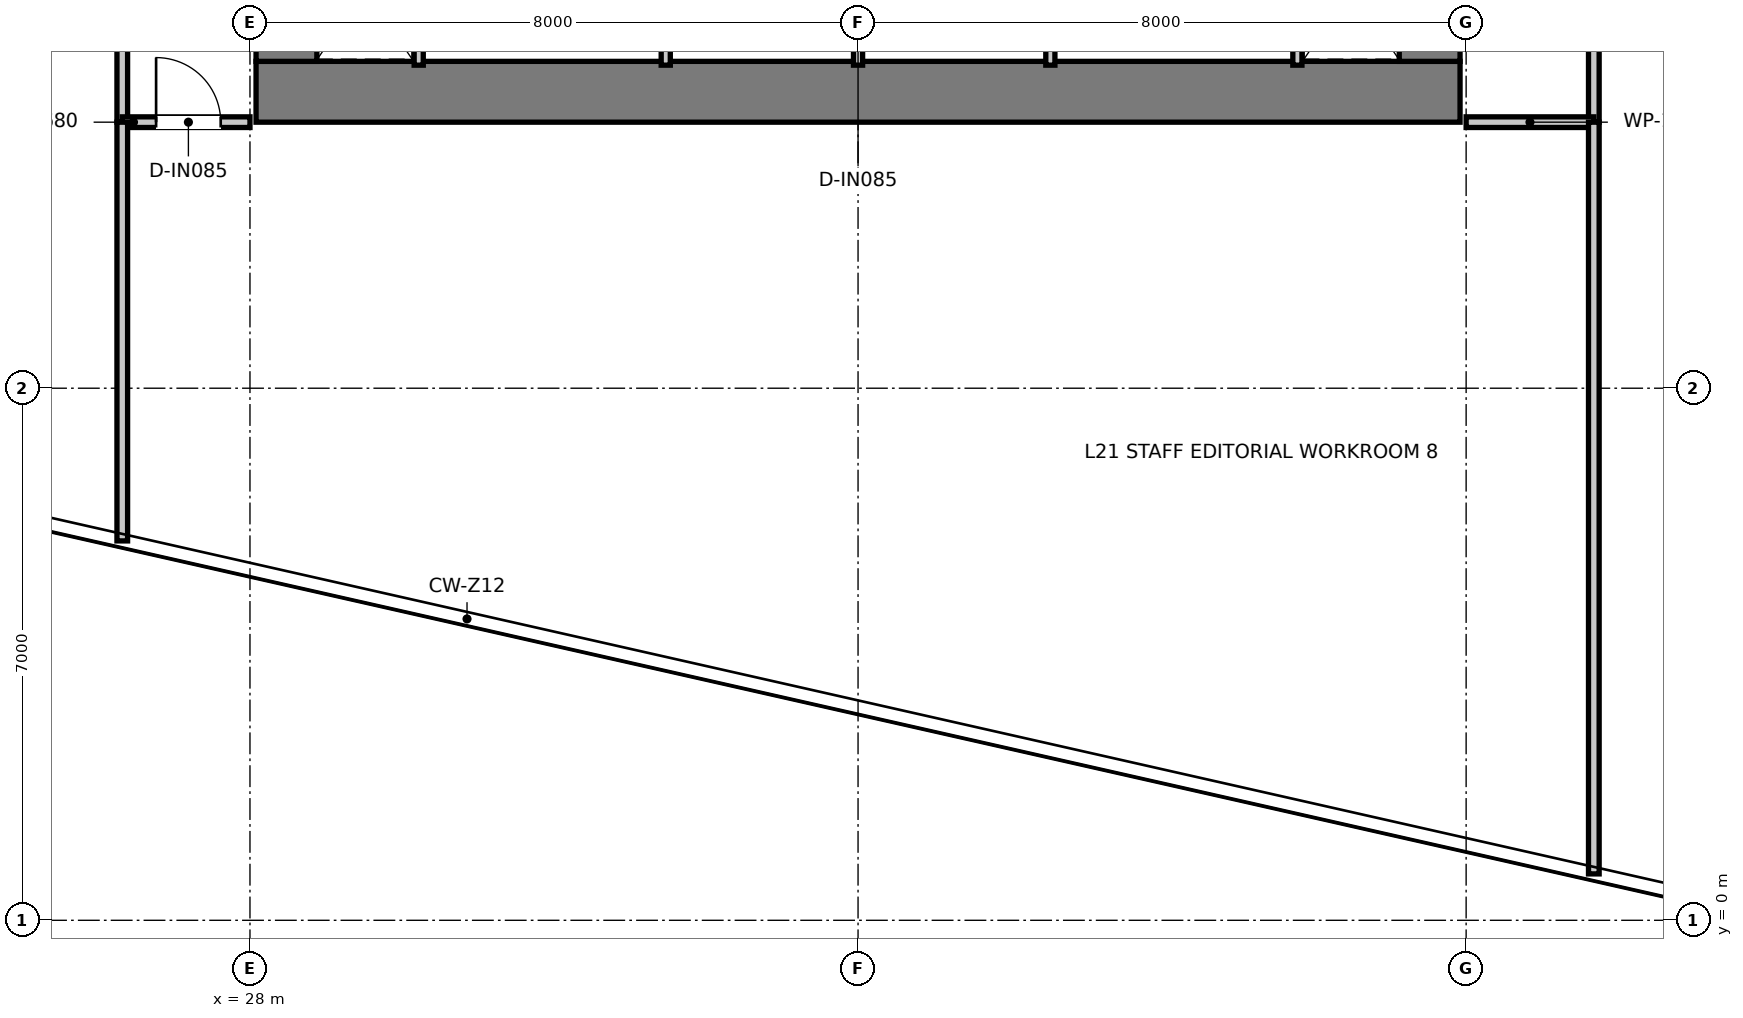
"""IFC4 building model, lengths in metres.
Left out: names, types, materials, properties, quantities, classifications, styles, units other than length and angle.
Written with IfcOpenShell. Run it as: python <this file> out.ifc"""

import sys

from ifc_helpers import new_model, si_unit, direction, frame, frame_2d, origin, place, context, subcontext, project, spatial, rectangle, extrude, element, fill, save


model = new_model("IFC4")
c1 = context("Model", 3, precision=1e-05, world=origin(), true_north=direction((0.0, 1.0)))
c2 = subcontext(c1, "Body", "Model", "MODEL_VIEW")
j1 = project(units=[si_unit("LENGTHUNIT", "METRE"), si_unit("PLANEANGLEUNIT", "RADIAN")], contexts=[c1])
p1 = place(None, origin())
s1 = spatial("IfcSite", under=j1, at=p1, CompositionType="ELEMENT")
p2 = place(p1, origin())
s2 = spatial("IfcBuilding", under=s1, at=p2, CompositionType="ELEMENT")
p3 = place(p2, frame((0.0, 0.0, 90.05)))
s3 = spatial("IfcBuildingStorey", under=s2, at=p3, CompositionType="ELEMENT", Elevation=90.05)
p4 = place(p3, frame((28.08, 10.9, 0.0), z_axis=(0.0, 0.0, 1.0), x_axis=(1.0, 0.0, 0.0)))
e1 = element("IfcWall", 1, at=p4, inside=s3, PredefinedType="SHEAR", context=c2, shape_type="SweptSolid", body=[
    extrude(rectangle(XDim=15.84, YDim=0.8, at=frame_2d((7.92, 0.0))), origin(), (0.0, 0.0, 1.0), 3.95),
])
for number, where, z_axis, x_axis in (
    (2, (28.48, 11.3, 0.0), (0.0, 0.0, 1.0), (0.0, 1.0, 0.0)),
    (3, (43.52, 11.3, 0.0), (0.0, 0.0, 1.0), (0.0, 1.0, 0.0)),
):
    element("IfcWall", number, at=place(p3, frame(where, z_axis=z_axis, x_axis=x_axis)), inside=s3, PredefinedType="SHEAR", context=c2, shape_type="SweptSolid", body=[
        extrude(rectangle(XDim=14.7, YDim=0.8, at=frame_2d((7.35, 0.0))), origin(), (0.0, 0.0, 1.0), 3.95),
    ])
for number, where, z_axis, x_axis in (
    (4, (30.22, 11.25, 0.0), (0.0, 0.0, 1.0), (0.0, 1.0, 0.0)),
    (5, (41.78, 11.25, 0.0), (0.0, 0.0, 1.0), (0.0, 1.0, 0.0)),
):
    element("IfcWall", number, at=place(p3, frame(where, z_axis=z_axis, x_axis=x_axis)), inside=s3, PredefinedType="PARTITIONING", context=c2, shape_type="SweptSolid", body=[
        extrude(rectangle(XDim=1.97, YDim=0.12, at=frame_2d((0.985, 0.0))), origin(), (0.0, 0.0, 1.0), 3.67),
    ])
for number, where, z_axis, x_axis in (
    (6, (33.47, 11.25, 0.0), (0.0, 0.0, 1.0), (0.0, 1.0, 0.0)),
    (7, (36.0, 11.25, 0.0), (0.0, 0.0, 1.0), (0.0, 1.0, 0.0)),
    (8, (38.53, 11.25, 0.0), (0.0, 0.0, 1.0), (0.0, 1.0, 0.0)),
):
    element("IfcWall", number, at=place(p3, frame(where, z_axis=z_axis, x_axis=x_axis)), inside=s3, PredefinedType="PARTITIONING", context=c2, shape_type="SweptSolid", body=[
        extrude(rectangle(XDim=1.03, YDim=0.12, at=frame_2d((0.515, 0.0))), origin(), (0.0, 0.0, 1.0), 3.67),
    ])
p5 = place(p3, frame((26.32, 10.5, 0.0), z_axis=(0.0, 0.0, 1.0), x_axis=(0.0, 1.0, 0.0)))
e9 = element("IfcWall", 9, at=p5, inside=s3, PredefinedType="PARTITIONING", context=c2, shape_type="SweptSolid", body=[
    extrude(rectangle(XDim=25.62, YDim=0.14, at=frame_2d((12.81, 0.0))), origin(), (0.0, 0.0, 1.0), 2.97),
])
p6 = place(p5, frame((8.025, 0.0, 0.0)))
e10 = element("IfcOpeningElement", 10, at=p6, cuts=e9, PredefinedType="OPENING", context=c2, shape_type="SweptSolid", body=[
    extrude(rectangle(XDim=0.95, YDim=2.1, at=frame_2d((0.475, 1.05))), frame((0.0, 0.08, 0.0), z_axis=(0.0, -1.0, 0.0), x_axis=(1.0, 0.0, 0.0)), (0.0, 0.0, 1.0), 0.16),
])
p7 = place(p5, frame((13.025, 0.0, 0.0)))
e11 = element("IfcOpeningElement", 11, at=p7, cuts=e9, PredefinedType="OPENING", context=c2, shape_type="SweptSolid", body=[
    extrude(rectangle(XDim=0.95, YDim=2.1, at=frame_2d((0.475, 1.05))), frame((0.0, 0.08, 0.0), z_axis=(0.0, -1.0, 0.0), x_axis=(1.0, 0.0, 0.0)), (0.0, 0.0, 1.0), 0.16),
])
p8 = place(p5, frame((20.125, 0.0, 0.0)))
e12 = element("IfcOpeningElement", 12, at=p8, cuts=e9, PredefinedType="OPENING", context=c2, shape_type="SweptSolid", body=[
    extrude(rectangle(XDim=0.95, YDim=2.1, at=frame_2d((0.475, 1.05))), frame((0.0, 0.08, 0.0), z_axis=(0.0, -1.0, 0.0), x_axis=(1.0, 0.0, 0.0)), (0.0, 0.0, 1.0), 0.16),
])
p9 = place(p3, frame((45.68, 10.5, 0.0), z_axis=(0.0, 0.0, 1.0), x_axis=(0.0, 1.0, 0.0)))
e13 = element("IfcWall", 13, at=p9, inside=s3, PredefinedType="PARTITIONING", context=c2, shape_type="SweptSolid", body=[
    extrude(rectangle(XDim=25.62, YDim=0.14, at=frame_2d((12.81, 0.0))), origin(), (0.0, 0.0, 1.0), 2.97),
])
p10 = place(p9, frame((15.125, 0.0, 0.0)))
e14 = element("IfcOpeningElement", 14, at=p10, cuts=e13, PredefinedType="OPENING", context=c2, shape_type="SweptSolid", body=[
    extrude(rectangle(XDim=0.95, YDim=2.1, at=frame_2d((0.475, 1.05))), frame((0.0, 0.08, 0.0), z_axis=(0.0, -1.0, 0.0), x_axis=(1.0, 0.0, 0.0)), (0.0, 0.0, 1.0), 0.16),
])
p11 = place(p3, frame((26.32, 10.5, 0.0), z_axis=(0.0, 0.0, 1.0), x_axis=(1.0, 0.0, 0.0)))
e15 = element("IfcWall", 15, at=p11, inside=s3, PredefinedType="PARTITIONING", context=c2, shape_type="SweptSolid", body=[
    extrude(rectangle(XDim=1.68, YDim=0.14, at=frame_2d((0.84, 0.0))), origin(), (0.0, 0.0, 1.0), 3.67),
])
p12 = place(p11, frame((0.445, 0.0, 0.0)))
e16 = element("IfcOpeningElement", 16, at=p12, cuts=e15, PredefinedType="OPENING", context=c2, shape_type="SweptSolid", body=[
    extrude(rectangle(XDim=0.85, YDim=2.1, at=frame_2d((0.425, 1.05))), frame((0.0, 0.08, 0.0), z_axis=(0.0, -1.0, 0.0), x_axis=(1.0, 0.0, 0.0)), (0.0, 0.0, 1.0), 0.16),
])
p13 = place(p3, frame((44.0, 10.5, 0.0), z_axis=(0.0, 0.0, 1.0), x_axis=(1.0, 0.0, 0.0)))
e17 = element("IfcWall", 17, at=p13, inside=s3, PredefinedType="PARTITIONING", context=c2, shape_type="SweptSolid", body=[
    extrude(rectangle(XDim=1.68, YDim=0.14, at=frame_2d((0.84, 0.0))), origin(), (0.0, 0.0, 1.0), 3.67),
])
p14 = place(p3, frame((26.32, 4.991, 0.0), z_axis=(0.0, 0.0, 1.0), x_axis=(0.0, 1.0, 0.0)))
e18 = element("IfcWall", 18, at=p14, inside=s3, PredefinedType="PARTITIONING", context=c2, shape_type="SweptSolid", body=[
    extrude(rectangle(XDim=5.509, YDim=0.14, at=frame_2d((2.754, 0.0))), origin(), (0.0, 0.0, 1.0), 3.67),
])
p15 = place(p3, frame((45.68, 0.61, 0.0), z_axis=(0.0, 0.0, 1.0), x_axis=(0.0, 1.0, 0.0)))
e19 = element("IfcWall", 19, at=p15, inside=s3, PredefinedType="PARTITIONING", context=c2, shape_type="SweptSolid", body=[
    extrude(rectangle(XDim=9.89, YDim=0.14, at=frame_2d((4.945, 0.0))), origin(), (0.0, 0.0, 1.0), 3.67),
])
p16 = place(p12, origin())
e20 = element("IfcDoor", 20, at=p16, inside=s3, OperationType="SINGLE_SWING_LEFT", PredefinedType="DOOR", context=c2, shape_type="SweptSolid", body=[
    extrude(rectangle(XDim=0.85, YDim=2.1, at=frame_2d((0.425, 1.05))), frame((0.0, 0.025, 0.0), z_axis=(0.0, -1.0, 0.0), x_axis=(1.0, 0.0, 0.0)), (0.0, 0.0, 1.0), 0.05),
])
fill(e16, e20)
save(model, sys.argv[1])
